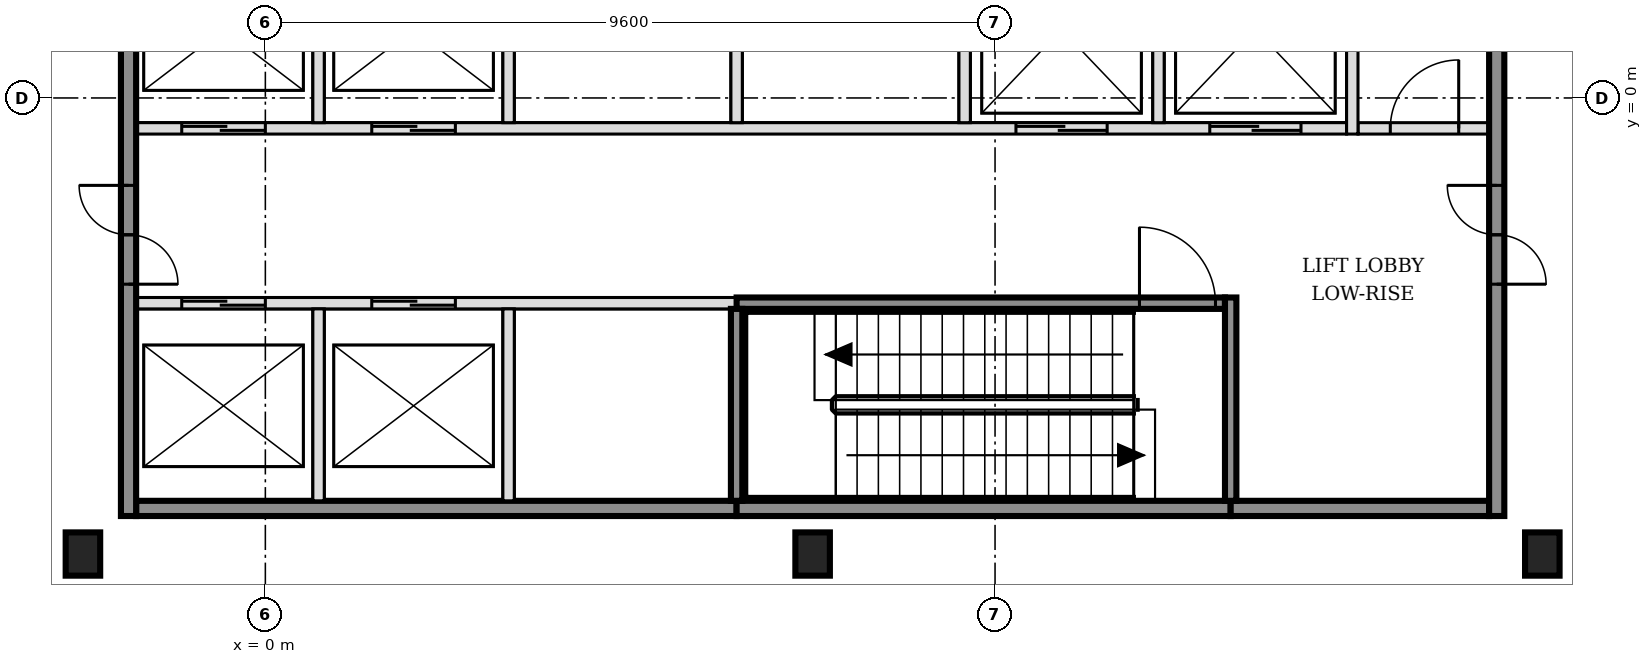
"""IFC4 building model, lengths in metres.
Left out: names, types, materials, properties, quantities, classifications, styles, units other than length and angle.
Written with IfcOpenShell. Run it as: python <this file> out.ifc"""

import sys

from ifc_helpers import new_model, si_unit, direction, frame, frame_2d, origin, origin_2d, place, context, subcontext, project, spatial, rectangle, i_section, extrude, element, fill, save


model = new_model("IFC4")
c1 = context("Model", 3, precision=1e-05, world=origin(), true_north=direction((0.0, 1.0)))
c2 = subcontext(c1, "Body", "Model", "MODEL_VIEW")
j1 = project(units=[si_unit("LENGTHUNIT", "METRE"), si_unit("PLANEANGLEUNIT", "RADIAN")], contexts=[c1])
p1 = place(None, origin())
s1 = spatial("IfcSite", under=j1, at=p1, CompositionType="ELEMENT")
p2 = place(p1, origin())
s2 = spatial("IfcBuilding", under=s1, at=p2, CompositionType="ELEMENT")
p3 = place(p2, frame((0.0, 0.0, 25.8)))
s3 = spatial("IfcBuildingStorey", under=s2, at=p3, CompositionType="ELEMENT", Elevation=25.8)
for number, where, z_axis, x_axis in (
    (1, (-2.4, -6.0, -0.2), (0.0, 0.0, 1.0), (1.0, 0.0, 0.0)),
    (2, (7.2, -6.0, -0.2), (0.0, 0.0, 1.0), (1.0, 0.0, 0.0)),
    (3, (16.8, -6.0, -0.2), (0.0, 0.0, 1.0), (1.0, 0.0, 0.0)),
):
    element("IfcColumn", number, at=place(p3, frame(where, z_axis=z_axis, x_axis=x_axis)), inside=s3, PredefinedType="COLUMN", context=c2, shape_type="SweptSolid", body=[
        extrude(i_section(OverallWidth=0.454, OverallDepth=0.569, WebThickness=0.078, FlangeThickness=0.125, FilletRadius=0.015, at=origin_2d()), origin(), (0.0, 0.0, 1.0), 4.8),
    ])
p4 = place(p3, frame((-1.7, -5.4, 0.0), z_axis=(0.0, 0.0, 1.0), x_axis=(1.0, 0.0, 0.0)))
e4 = element("IfcWall", 4, at=p4, inside=s3, PredefinedType="SOLIDWALL", context=c2, shape_type="SweptSolid", body=[
    extrude(rectangle(XDim=7.9, YDim=0.2, at=frame_2d((3.95, 0.0))), origin(), (0.0, 0.0, 1.0), 4.6),
])
p5 = place(p3, frame((6.2, -5.4, 0.0), z_axis=(0.0, 0.0, 1.0), x_axis=(1.0, 0.0, 0.0)))
e5 = element("IfcWall", 5, at=p5, inside=s3, PredefinedType="SOLIDWALL", context=c2, shape_type="SweptSolid", body=[
    extrude(rectangle(XDim=6.5, YDim=0.2, at=frame_2d((3.25, 0.0))), origin(), (0.0, 0.0, 1.0), 4.6),
])
p6 = place(p3, frame((12.7, -5.4, 0.0), z_axis=(0.0, 0.0, 1.0), x_axis=(1.0, 0.0, 0.0)))
e6 = element("IfcWall", 6, at=p6, inside=s3, PredefinedType="SOLIDWALL", context=c2, shape_type="SweptSolid", body=[
    extrude(rectangle(XDim=3.4, YDim=0.2, at=frame_2d((1.7, 0.0))), origin(), (0.0, 0.0, 1.0), 4.6),
])
p7 = place(p3, frame((-1.7, -2.7, 0.0), z_axis=(0.0, 0.0, 1.0), x_axis=(1.0, 0.0, 0.0)))
e7 = element("IfcWall", 7, at=p7, inside=s3, PredefinedType="SOLIDWALL", context=c2, shape_type="SweptSolid", body=[
    extrude(rectangle(XDim=7.9, YDim=0.15, at=frame_2d((3.95, 0.0))), origin(), (0.0, 0.0, 1.0), 4.6),
])
p8 = place(p7, frame((0.6, 0.0, 0.0)))
e8 = element("IfcOpeningElement", 8, at=p8, cuts=e7, PredefinedType="OPENING", context=c2, shape_type="SweptSolid", body=[
    extrude(rectangle(XDim=1.1, YDim=2.1, at=frame_2d((0.55, 1.05))), frame((0.0, 0.085, 0.0), z_axis=(0.0, -1.0, 0.0), x_axis=(1.0, 0.0, 0.0)), (0.0, 0.0, 1.0), 0.17),
])
p9 = place(p7, frame((3.1, 0.0, 0.0)))
e9 = element("IfcOpeningElement", 9, at=p9, cuts=e7, PredefinedType="OPENING", context=c2, shape_type="SweptSolid", body=[
    extrude(rectangle(XDim=1.1, YDim=2.1, at=frame_2d((0.55, 1.05))), frame((0.0, 0.085, 0.0), z_axis=(0.0, -1.0, 0.0), x_axis=(1.0, 0.0, 0.0)), (0.0, 0.0, 1.0), 0.17),
])
p10 = place(p3, frame((6.2, -2.7, 0.0), z_axis=(0.0, 0.0, 1.0), x_axis=(1.0, 0.0, 0.0)))
e10 = element("IfcWall", 10, at=p10, inside=s3, PredefinedType="SOLIDWALL", context=c2, shape_type="SweptSolid", body=[
    extrude(rectangle(XDim=6.425, YDim=0.15, at=frame_2d((3.212, 0.0))), origin(), (0.0, 0.0, 1.0), 4.6),
])
p11 = place(p10, frame((5.3, 0.0, 0.0)))
e11 = element("IfcOpeningElement", 11, at=p11, cuts=e10, PredefinedType="OPENING", context=c2, shape_type="SweptSolid", body=[
    extrude(rectangle(XDim=1.0, YDim=2.1, at=frame_2d((0.5, 1.05))), frame((0.0, 0.085, 0.0), z_axis=(0.0, -1.0, 0.0), x_axis=(1.0, 0.0, 0.0)), (0.0, 0.0, 1.0), 0.17),
])
p12 = place(p3, frame((-1.7, -0.4, 0.0), z_axis=(0.0, 0.0, 1.0), x_axis=(1.0, 0.0, 0.0)))
e12 = element("IfcWall", 12, at=p12, inside=s3, PredefinedType="SOLIDWALL", context=c2, shape_type="SweptSolid", body=[
    extrude(rectangle(XDim=15.925, YDim=0.15, at=frame_2d((7.962, 0.0))), origin(), (0.0, 0.0, 1.0), 4.6),
])
p13 = place(p12, frame((0.6, 0.0, 0.0)))
e13 = element("IfcOpeningElement", 13, at=p13, cuts=e12, PredefinedType="OPENING", context=c2, shape_type="SweptSolid", body=[
    extrude(rectangle(XDim=1.1, YDim=2.1, at=frame_2d((0.55, 1.05))), frame((0.0, 0.085, 0.0), z_axis=(0.0, -1.0, 0.0), x_axis=(1.0, 0.0, 0.0)), (0.0, 0.0, 1.0), 0.17),
])
p14 = place(p12, frame((3.1, 0.0, 0.0)))
e14 = element("IfcOpeningElement", 14, at=p14, cuts=e12, PredefinedType="OPENING", context=c2, shape_type="SweptSolid", body=[
    extrude(rectangle(XDim=1.1, YDim=2.1, at=frame_2d((0.55, 1.05))), frame((0.0, 0.085, 0.0), z_axis=(0.0, -1.0, 0.0), x_axis=(1.0, 0.0, 0.0)), (0.0, 0.0, 1.0), 0.17),
])
p15 = place(p12, frame((11.575, 0.0, 0.0)))
e15 = element("IfcOpeningElement", 15, at=p15, cuts=e12, PredefinedType="OPENING", context=c2, shape_type="SweptSolid", body=[
    extrude(rectangle(XDim=1.2, YDim=2.1, at=frame_2d((0.6, 1.05))), frame((0.0, 0.085, 0.0), z_axis=(0.0, -1.0, 0.0), x_axis=(1.0, 0.0, 0.0)), (0.0, 0.0, 1.0), 0.17),
])
p16 = place(p12, frame((14.125, 0.0, 0.0)))
e16 = element("IfcOpeningElement", 16, at=p16, cuts=e12, PredefinedType="OPENING", context=c2, shape_type="SweptSolid", body=[
    extrude(rectangle(XDim=1.2, YDim=2.1, at=frame_2d((0.6, 1.05))), frame((0.0, 0.085, 0.0), z_axis=(0.0, -1.0, 0.0), x_axis=(1.0, 0.0, 0.0)), (0.0, 0.0, 1.0), 0.17),
])
p17 = place(p3, frame((14.375, -0.4, 0.0), z_axis=(0.0, 0.0, 1.0), x_axis=(1.0, 0.0, 0.0)))
e17 = element("IfcWall", 17, at=p17, inside=s3, PredefinedType="PARTITIONING", context=c2, shape_type="SweptSolid", body=[
    extrude(rectangle(XDim=1.725, YDim=0.15, at=frame_2d((0.863, 0.0))), origin(), (0.0, 0.0, 1.0), 4.6),
])
p18 = place(p17, frame((0.425, 0.0, 0.0)))
e18 = element("IfcOpeningElement", 18, at=p18, cuts=e17, PredefinedType="OPENING", context=c2, shape_type="SweptSolid", body=[
    extrude(rectangle(XDim=0.9, YDim=2.1, at=frame_2d((0.45, 1.05))), frame((0.0, 0.085, 0.0), z_axis=(0.0, -1.0, 0.0), x_axis=(1.0, 0.0, 0.0)), (0.0, 0.0, 1.0), 0.17),
])
p19 = place(p3, frame((-1.8, -5.5, 0.0), z_axis=(0.0, 0.0, 1.0), x_axis=(0.0, 1.0, 0.0)))
e19 = element("IfcWall", 19, at=p19, inside=s3, PredefinedType="SOLIDWALL", context=c2, shape_type="SweptSolid", body=[
    extrude(rectangle(XDim=15.8, YDim=0.2, at=frame_2d((7.9, 0.0))), origin(), (0.0, 0.0, 1.0), 4.6),
])
p20 = place(p19, frame((3.05, 0.0, 0.0)))
e20 = element("IfcOpeningElement", 20, at=p20, cuts=e19, PredefinedType="OPENING", context=c2, shape_type="SweptSolid", body=[
    extrude(rectangle(XDim=1.3, YDim=2.1, at=frame_2d((0.65, 1.05))), frame((0.0, 0.11, 0.0), z_axis=(0.0, -1.0, 0.0), x_axis=(1.0, 0.0, 0.0)), (0.0, 0.0, 1.0), 0.22),
])
p21 = place(p19, frame((11.45, 0.0, 0.0)))
e21 = element("IfcOpeningElement", 21, at=p21, cuts=e19, PredefinedType="OPENING", context=c2, shape_type="SweptSolid", body=[
    extrude(rectangle(XDim=1.3, YDim=2.1, at=frame_2d((0.65, 1.05))), frame((0.0, 0.11, 0.0), z_axis=(0.0, -1.0, 0.0), x_axis=(1.0, 0.0, 0.0)), (0.0, 0.0, 1.0), 0.22),
])
p22 = place(p3, frame((0.7, -5.3, 0.0), z_axis=(0.0, 0.0, 1.0), x_axis=(0.0, 1.0, 0.0)))
e22 = element("IfcWall", 22, at=p22, inside=s3, PredefinedType="SOLIDWALL", context=c2, shape_type="SweptSolid", body=[
    extrude(rectangle(XDim=2.525, YDim=0.15, at=frame_2d((1.263, 0.0))), origin(), (0.0, 0.0, 1.0), 4.6),
])
p23 = place(p3, frame((0.7, -0.325, 0.0), z_axis=(0.0, 0.0, 1.0), x_axis=(0.0, 1.0, 0.0)))
e23 = element("IfcWall", 23, at=p23, inside=s3, PredefinedType="SOLIDWALL", context=c2, shape_type="SweptSolid", body=[
    extrude(rectangle(XDim=2.45, YDim=0.15, at=frame_2d((1.225, 0.0))), origin(), (0.0, 0.0, 1.0), 4.6),
])
p24 = place(p3, frame((3.2, -5.3, 0.0), z_axis=(0.0, 0.0, 1.0), x_axis=(0.0, 1.0, 0.0)))
e24 = element("IfcWall", 24, at=p24, inside=s3, PredefinedType="SOLIDWALL", context=c2, shape_type="SweptSolid", body=[
    extrude(rectangle(XDim=2.525, YDim=0.15, at=frame_2d((1.263, 0.0))), origin(), (0.0, 0.0, 1.0), 4.6),
])
p25 = place(p3, frame((3.2, -0.325, 0.0), z_axis=(0.0, 0.0, 1.0), x_axis=(0.0, 1.0, 0.0)))
e25 = element("IfcWall", 25, at=p25, inside=s3, PredefinedType="SOLIDWALL", context=c2, shape_type="SweptSolid", body=[
    extrude(rectangle(XDim=2.45, YDim=0.15, at=frame_2d((1.225, 0.0))), origin(), (0.0, 0.0, 1.0), 4.6),
])
p26 = place(p3, frame((6.2, -5.3, 0.0), z_axis=(0.0, 0.0, 1.0), x_axis=(0.0, 1.0, 0.0)))
e26 = element("IfcWall", 26, at=p26, inside=s3, PredefinedType="SOLIDWALL", context=c2, shape_type="SweptSolid", body=[
    extrude(rectangle(XDim=2.525, YDim=0.15, at=frame_2d((1.263, 0.0))), origin(), (0.0, 0.0, 1.0), 4.6),
])
for number, where, z_axis, x_axis in (
    (27, (6.2, -0.325, 0.0), (0.0, 0.0, 1.0), (0.0, 1.0, 0.0)),
    (28, (9.2, -0.325, 0.0), (0.0, 0.0, 1.0), (0.0, 1.0, 0.0)),
    (29, (11.75, -0.325, 0.0), (0.0, 0.0, 1.0), (0.0, 1.0, 0.0)),
):
    element("IfcWall", number, at=place(p3, frame(where, z_axis=z_axis, x_axis=x_axis)), inside=s3, PredefinedType="SOLIDWALL", context=c2, shape_type="SweptSolid", body=[
        extrude(rectangle(XDim=2.45, YDim=0.15, at=frame_2d((1.225, 0.0))), origin(), (0.0, 0.0, 1.0), 4.6),
    ])
p27 = place(p3, frame((12.7, -5.3, 0.0), z_axis=(0.0, 0.0, 1.0), x_axis=(0.0, 1.0, 0.0)))
e30 = element("IfcWall", 30, at=p27, inside=s3, PredefinedType="SOLIDWALL", context=c2, shape_type="SweptSolid", body=[
    extrude(rectangle(XDim=2.675, YDim=0.15, at=frame_2d((1.337, 0.0))), origin(), (0.0, 0.0, 1.0), 4.6),
])
p28 = place(p3, frame((14.3, -0.475, 0.0), z_axis=(0.0, 0.0, 1.0), x_axis=(0.0, 1.0, 0.0)))
e31 = element("IfcWall", 31, at=p28, inside=s3, PredefinedType="SOLIDWALL", context=c2, shape_type="SweptSolid", body=[
    extrude(rectangle(XDim=2.75, YDim=0.15, at=frame_2d((1.375, 0.0))), origin(), (0.0, 0.0, 1.0), 4.6),
])
p29 = place(p3, frame((16.2, -5.5, 0.0), z_axis=(0.0, 0.0, 1.0), x_axis=(0.0, 1.0, 0.0)))
e32 = element("IfcWall", 32, at=p29, inside=s3, PredefinedType="SOLIDWALL", context=c2, shape_type="SweptSolid", body=[
    extrude(rectangle(XDim=15.8, YDim=0.2, at=frame_2d((7.9, 0.0))), origin(), (0.0, 0.0, 1.0), 4.6),
])
p30 = place(p29, frame((3.05, 0.0, 0.0)))
e33 = element("IfcOpeningElement", 33, at=p30, cuts=e32, PredefinedType="OPENING", context=c2, shape_type="SweptSolid", body=[
    extrude(rectangle(XDim=1.3, YDim=2.1, at=frame_2d((0.65, 1.05))), frame((0.0, 0.11, 0.0), z_axis=(0.0, -1.0, 0.0), x_axis=(1.0, 0.0, 0.0)), (0.0, 0.0, 1.0), 0.22),
])
p31 = place(p29, frame((11.45, 0.0, 0.0)))
e34 = element("IfcOpeningElement", 34, at=p31, cuts=e32, PredefinedType="OPENING", context=c2, shape_type="SweptSolid", body=[
    extrude(rectangle(XDim=1.3, YDim=2.1, at=frame_2d((0.65, 1.05))), frame((0.0, 0.11, 0.0), z_axis=(0.0, -1.0, 0.0), x_axis=(1.0, 0.0, 0.0)), (0.0, 0.0, 1.0), 0.22),
])
p32 = place(p8, origin())
e35 = element("IfcDoor", 35, at=p32, inside=s3, OperationType="DOUBLE_DOOR_SLIDING", PredefinedType="DOOR", context=c2, shape_type="SweptSolid", body=[
    extrude(rectangle(XDim=1.1, YDim=2.1, at=frame_2d((0.55, 1.05))), frame((0.0, 0.025, 0.0), z_axis=(0.0, -1.0, 0.0), x_axis=(1.0, 0.0, 0.0)), (0.0, 0.0, 1.0), 0.05),
])
fill(e8, e35)
p33 = place(p9, origin())
e36 = element("IfcDoor", 36, at=p33, inside=s3, OperationType="DOUBLE_DOOR_SLIDING", PredefinedType="DOOR", context=c2, shape_type="SweptSolid", body=[
    extrude(rectangle(XDim=1.1, YDim=2.1, at=frame_2d((0.55, 1.05))), frame((0.0, 0.025, 0.0), z_axis=(0.0, -1.0, 0.0), x_axis=(1.0, 0.0, 0.0)), (0.0, 0.0, 1.0), 0.05),
])
fill(e9, e36)
p34 = place(p13, origin())
e37 = element("IfcDoor", 37, at=p34, inside=s3, OperationType="DOUBLE_DOOR_SLIDING", PredefinedType="DOOR", context=c2, shape_type="SweptSolid", body=[
    extrude(rectangle(XDim=1.1, YDim=2.1, at=frame_2d((0.55, 1.05))), frame((0.0, 0.025, 0.0), z_axis=(0.0, -1.0, 0.0), x_axis=(1.0, 0.0, 0.0)), (0.0, 0.0, 1.0), 0.05),
])
fill(e13, e37)
p35 = place(p14, origin())
e38 = element("IfcDoor", 38, at=p35, inside=s3, OperationType="DOUBLE_DOOR_SLIDING", PredefinedType="DOOR", context=c2, shape_type="SweptSolid", body=[
    extrude(rectangle(XDim=1.1, YDim=2.1, at=frame_2d((0.55, 1.05))), frame((0.0, 0.025, 0.0), z_axis=(0.0, -1.0, 0.0), x_axis=(1.0, 0.0, 0.0)), (0.0, 0.0, 1.0), 0.05),
])
fill(e14, e38)
p36 = place(p15, origin())
e39 = element("IfcDoor", 39, at=p36, inside=s3, OperationType="DOUBLE_DOOR_SLIDING", PredefinedType="DOOR", context=c2, shape_type="SweptSolid", body=[
    extrude(rectangle(XDim=1.2, YDim=2.1, at=frame_2d((0.6, 1.05))), frame((0.0, 0.025, 0.0), z_axis=(0.0, -1.0, 0.0), x_axis=(1.0, 0.0, 0.0)), (0.0, 0.0, 1.0), 0.05),
])
fill(e15, e39)
p37 = place(p16, origin())
e40 = element("IfcDoor", 40, at=p37, inside=s3, OperationType="DOUBLE_DOOR_SLIDING", PredefinedType="DOOR", context=c2, shape_type="SweptSolid", body=[
    extrude(rectangle(XDim=1.2, YDim=2.1, at=frame_2d((0.6, 1.05))), frame((0.0, 0.025, 0.0), z_axis=(0.0, -1.0, 0.0), x_axis=(1.0, 0.0, 0.0)), (0.0, 0.0, 1.0), 0.05),
])
fill(e16, e40)
p38 = place(p11, origin())
e41 = element("IfcDoor", 41, at=p38, inside=s3, OperationType="SINGLE_SWING_LEFT", PredefinedType="DOOR", context=c2, shape_type="SweptSolid", body=[
    extrude(rectangle(XDim=1.0, YDim=2.1, at=frame_2d((0.5, 1.05))), frame((0.0, 0.025, 0.0), z_axis=(0.0, -1.0, 0.0), x_axis=(1.0, 0.0, 0.0)), (0.0, 0.0, 1.0), 0.05),
])
fill(e11, e41)
p39 = place(p20, origin())
e42 = element("IfcDoor", 42, at=p39, inside=s3, OperationType="DOUBLE_DOOR_SINGLE_SWING", PredefinedType="DOOR", context=c2, shape_type="SweptSolid", body=[
    extrude(rectangle(XDim=1.3, YDim=2.1, at=frame_2d((0.65, 1.05))), frame((0.0, 0.025, 0.0), z_axis=(0.0, -1.0, 0.0), x_axis=(1.0, 0.0, 0.0)), (0.0, 0.0, 1.0), 0.05),
])
fill(e20, e42)
p40 = place(p30, origin())
e43 = element("IfcDoor", 43, at=p40, inside=s3, OperationType="DOUBLE_DOOR_SINGLE_SWING", PredefinedType="DOOR", context=c2, shape_type="SweptSolid", body=[
    extrude(rectangle(XDim=1.3, YDim=2.1, at=frame_2d((0.65, 1.05))), frame((0.0, 0.025, 0.0), z_axis=(0.0, -1.0, 0.0), x_axis=(1.0, 0.0, 0.0)), (0.0, 0.0, 1.0), 0.05),
])
fill(e33, e43)
p41 = place(p18, origin())
e44 = element("IfcDoor", 44, at=p41, inside=s3, OperationType="SINGLE_SWING_RIGHT", PredefinedType="DOOR", context=c2, shape_type="SweptSolid", body=[
    extrude(rectangle(XDim=0.9, YDim=2.1, at=frame_2d((0.45, 1.05))), frame((0.0, 0.025, 0.0), z_axis=(0.0, -1.0, 0.0), x_axis=(1.0, 0.0, 0.0)), (0.0, 0.0, 1.0), 0.05),
])
fill(e18, e44)
save(model, sys.argv[1])
